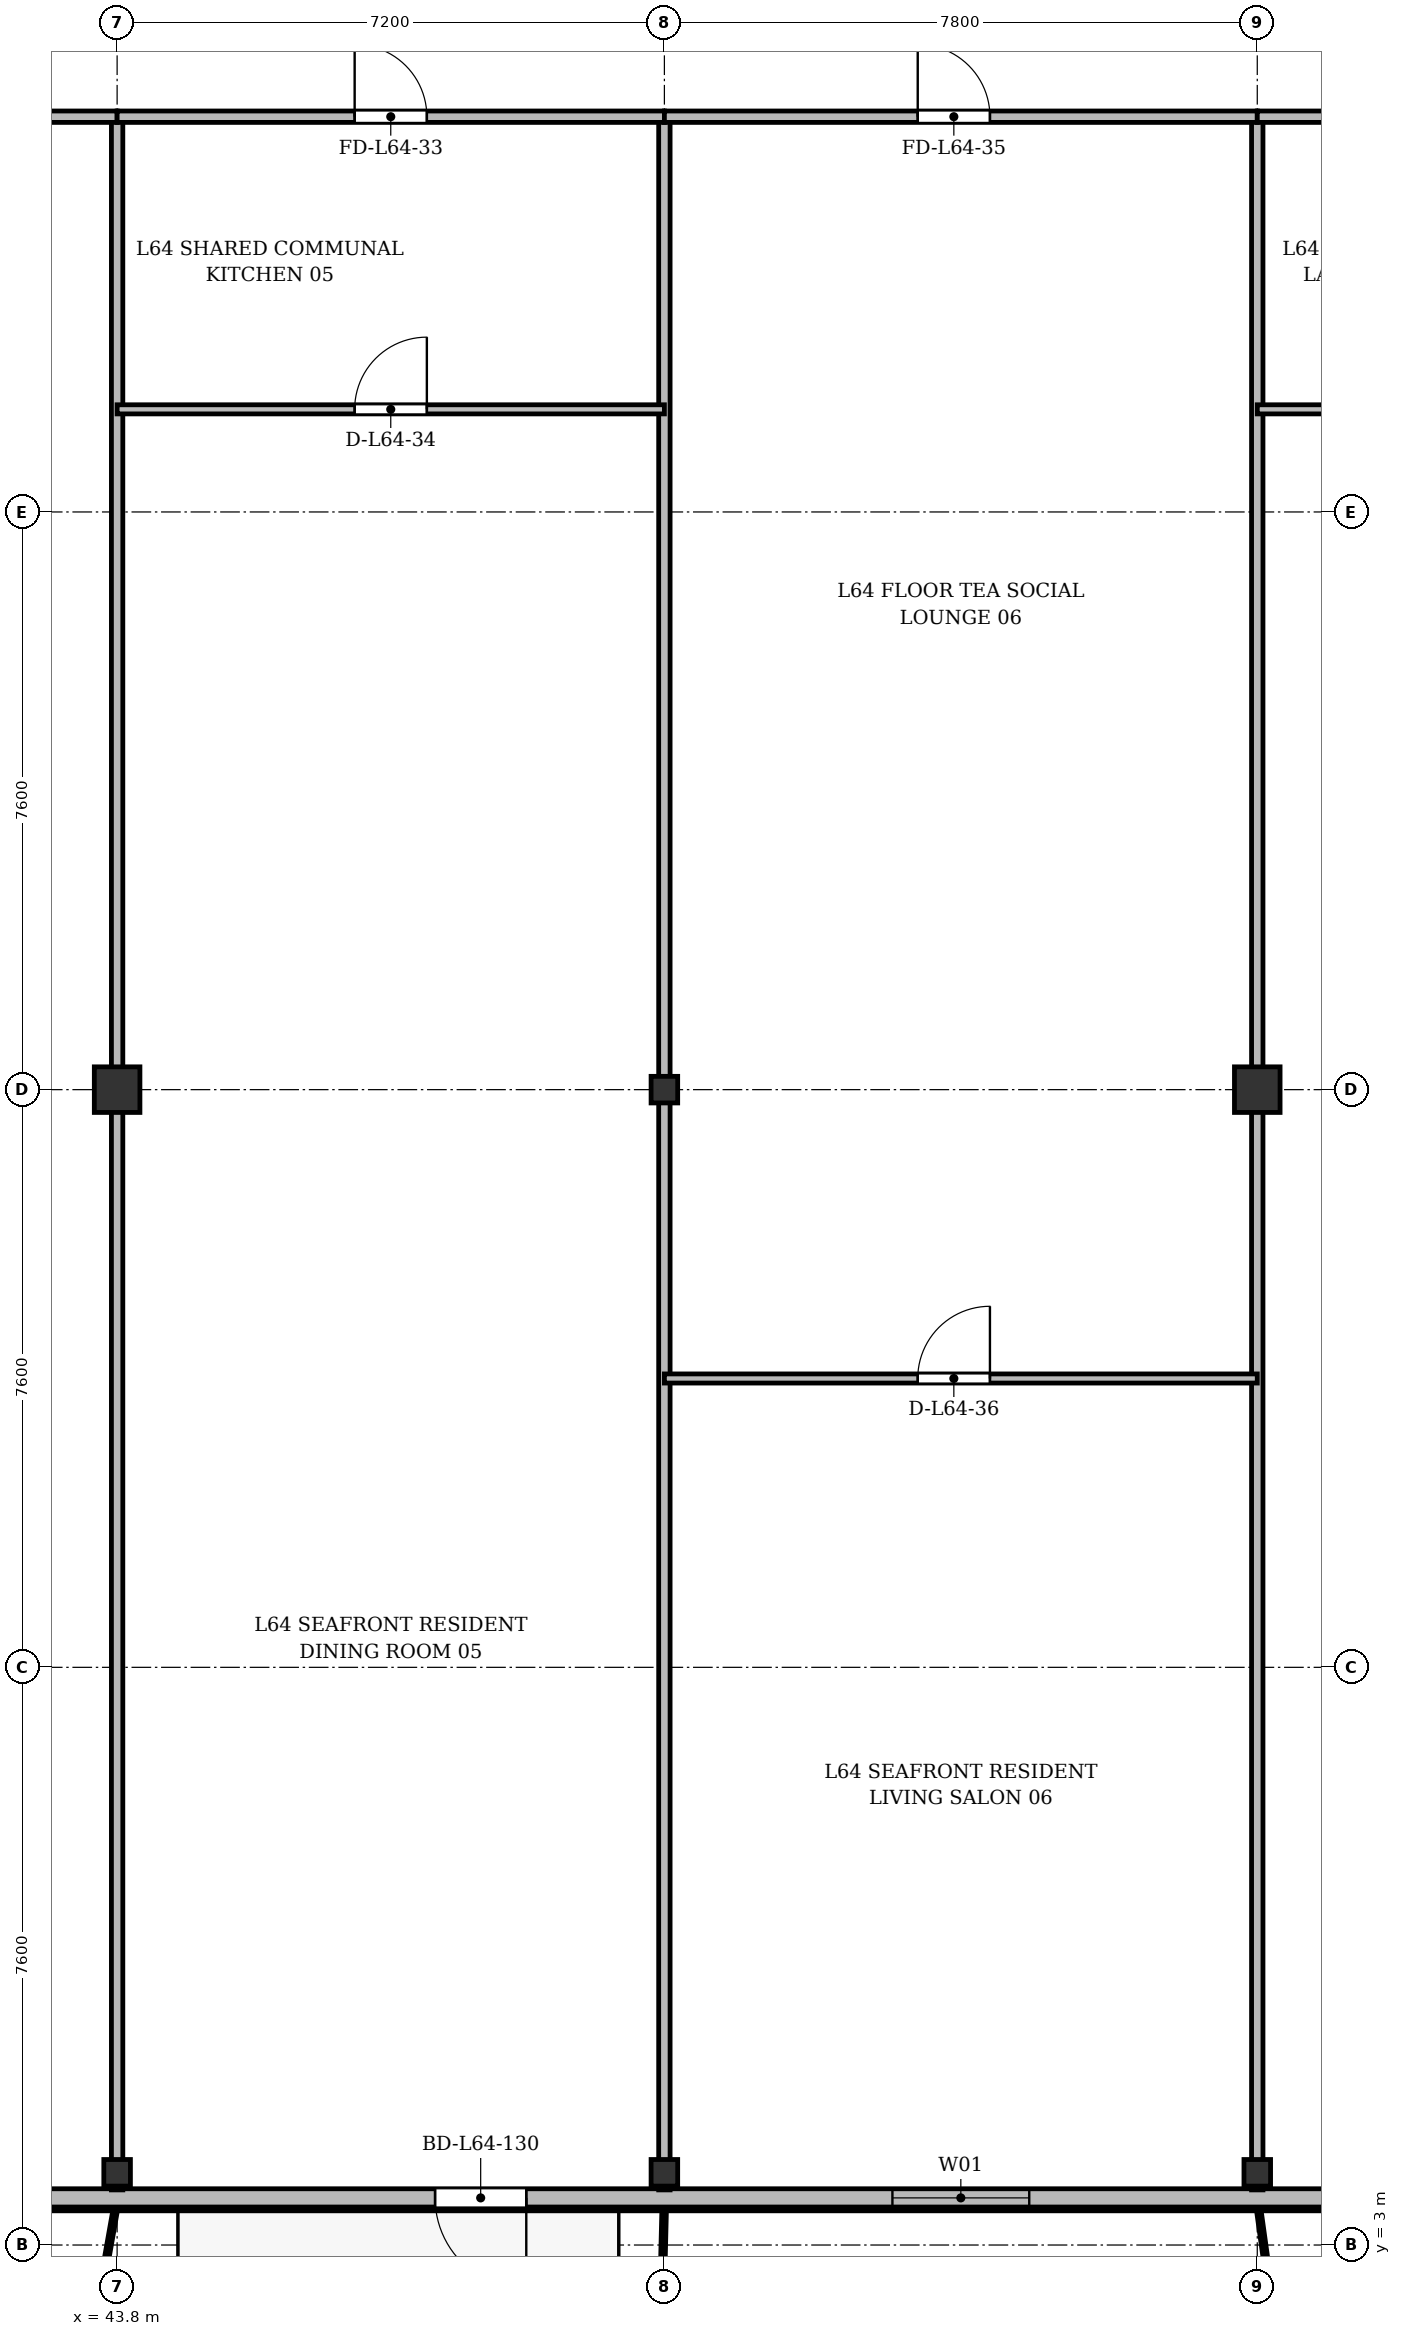
"""IFC4 building model, lengths in metres.
Left out: names, types, materials, properties, quantities, classifications, styles, units other than length and angle.
Written with IfcOpenShell. Run it as: python <this file> out.ifc"""

import sys

from ifc_helpers import new_model, si_unit, direction, frame, frame_2d, origin, origin_2d, place, context, subcontext, project, spatial, rectangle, i_section, extrude, source, transform, mapped, element, fill, save


model = new_model("IFC4")
c1 = context("Model", 3, precision=1e-05, world=origin(), true_north=direction((0.0, 1.0)))
c2 = subcontext(c1, "Body", "Model", "MODEL_VIEW")
j1 = project(units=[si_unit("LENGTHUNIT", "METRE"), si_unit("PLANEANGLEUNIT", "RADIAN")], contexts=[c1])
p1 = place(None, origin())
s1 = spatial("IfcSite", under=j1, at=p1, CompositionType="ELEMENT")
p2 = place(p1, origin())
s2 = spatial("IfcBuilding", under=s1, at=p2, CompositionType="ELEMENT")
p3 = place(p2, frame((0.0, 0.0, 248.7)))
s3 = spatial("IfcBuildingStorey", under=s2, at=p3, CompositionType="ELEMENT", Elevation=248.7)
m1 = source(origin(), c2, "Body", "SweptSolid", [
    extrude(i_section(OverallWidth=0.35, OverallDepth=0.35, WebThickness=0.018, FlangeThickness=0.028, at=origin_2d()), origin(), (0.0, 0.0, 1.0), 3.6),
])
p4 = place(p3, frame((43.8, 3.95, 0.0), z_axis=(0.0, 0.0, 1.0), x_axis=(1.0, 0.0, 0.0)))
e1 = element("IfcColumn", 1, at=p4, inside=s3, PredefinedType="COLUMN", context=c2, shape_type="MappedRepresentation", body=[
    mapped(m1, transform((0.0, 0.0, 0.0), x_axis=(1.0, 0.0, 0.0), y_axis=(0.0, 1.0, 0.0), z_axis=(0.0, 0.0, 1.0), scale=1.0)),
])
m2 = source(origin(), c2, "Body", "SweptSolid", [
    extrude(rectangle(XDim=0.6, YDim=0.6, at=origin_2d()), origin(), (0.0, 0.0, 1.0), 3.6),
])
p5 = place(p3, frame((43.8, 18.2, 0.0), z_axis=(0.0, 0.0, 1.0), x_axis=(1.0, 0.0, 0.0)))
e2 = element("IfcColumn", 2, at=p5, inside=s3, PredefinedType="COLUMN", context=c2, shape_type="MappedRepresentation", body=[
    mapped(m2, transform((0.0, 0.0, 0.0), x_axis=(1.0, 0.0, 0.0), y_axis=(0.0, 1.0, 0.0), z_axis=(0.0, 0.0, 1.0), scale=1.0)),
])
for number, where, z_axis, x_axis in (
    (3, (51.0, 3.95, 0.0), (0.0, 0.0, 1.0), (1.0, 0.0, 0.0)),
    (4, (51.0, 18.2, 0.0), (0.0, 0.0, 1.0), (1.0, 0.0, 0.0)),
    (5, (58.8, 3.95, 0.0), (0.0, 0.0, 1.0), (1.0, 0.0, 0.0)),
):
    element("IfcColumn", number, at=place(p3, frame(where, z_axis=z_axis, x_axis=x_axis)), inside=s3, PredefinedType="COLUMN", context=c2, shape_type="MappedRepresentation", body=[
        mapped(m1, transform((0.0, 0.0, 0.0), x_axis=(1.0, 0.0, 0.0), y_axis=(0.0, 1.0, 0.0), z_axis=(0.0, 0.0, 1.0), scale=1.0)),
    ])
p6 = place(p3, frame((58.8, 18.2, 0.0), z_axis=(0.0, 0.0, 1.0), x_axis=(1.0, 0.0, 0.0)))
e6 = element("IfcColumn", 6, at=p6, inside=s3, PredefinedType="COLUMN", context=c2, shape_type="MappedRepresentation", body=[
    mapped(m2, transform((0.0, 0.0, 0.0), x_axis=(1.0, 0.0, 0.0), y_axis=(0.0, 1.0, 0.0), z_axis=(0.0, 0.0, 1.0), scale=1.0)),
])
p7 = place(p3, frame((63.2, 3.62, 0.0), z_axis=(0.0, 0.0, 1.0), x_axis=(-1.0, 0.0, 0.0)))
e7 = element("IfcWall", 7, at=p7, inside=s3, PredefinedType="SOLIDWALL", context=c2, shape_type="SweptSolid", body=[
    extrude(rectangle(XDim=52.0, YDim=0.24, at=frame_2d((26.0, 0.0))), origin(), (0.0, 0.0, 1.0), 3.37),
])
p8 = place(p7, frame((1.42, 0.0, 0.9)))
e8 = element("IfcOpeningElement", 8, at=p8, cuts=e7, PredefinedType="OPENING", context=c2, shape_type="SweptSolid", body=[
    extrude(rectangle(XDim=1.65, YDim=1.85, at=frame_2d((0.825, 0.925))), frame((0.0, 0.13, 0.0), z_axis=(0.0, -1.0, 0.0), x_axis=(1.0, 0.0, 0.0)), (0.0, 0.0, 1.0), 0.26),
])
p9 = place(p7, frame((7.4, 0.0, 0.9)))
e9 = element("IfcOpeningElement", 9, at=p9, cuts=e7, PredefinedType="OPENING", context=c2, shape_type="SweptSolid", body=[
    extrude(rectangle(XDim=1.8, YDim=1.8, at=frame_2d((0.9, 0.9))), frame((0.0, 0.13, 0.0), z_axis=(0.0, -1.0, 0.0), x_axis=(1.0, 0.0, 0.0)), (0.0, 0.0, 1.0), 0.26),
])
p10 = place(p7, frame((14.017, 0.0, 0.0)))
e10 = element("IfcOpeningElement", 10, at=p10, cuts=e7, PredefinedType="OPENING", context=c2, shape_type="SweptSolid", body=[
    extrude(rectangle(XDim=1.2, YDim=2.2, at=frame_2d((0.6, 1.1))), frame((0.0, 0.13, 0.0), z_axis=(0.0, -1.0, 0.0), x_axis=(1.0, 0.0, 0.0)), (0.0, 0.0, 1.0), 0.26),
])
p11 = place(p7, frame((25.25, 0.0, 0.9)))
e11 = element("IfcOpeningElement", 11, at=p11, cuts=e7, PredefinedType="OPENING", context=c2, shape_type="SweptSolid", body=[
    extrude(rectangle(XDim=1.5, YDim=1.75, at=frame_2d((0.75, 0.875))), frame((0.0, 0.13, 0.0), z_axis=(0.0, -1.0, 0.0), x_axis=(1.0, 0.0, 0.0)), (0.0, 0.0, 1.0), 0.26),
])
p12 = place(p7, frame((35.2, 0.0, 0.9)))
e12 = element("IfcOpeningElement", 12, at=p12, cuts=e7, PredefinedType="OPENING", context=c2, shape_type="SweptSolid", body=[
    extrude(rectangle(XDim=2.0, YDim=1.95, at=frame_2d((1.0, 0.975))), frame((0.0, 0.13, 0.0), z_axis=(0.0, -1.0, 0.0), x_axis=(1.0, 0.0, 0.0)), (0.0, 0.0, 1.0), 0.26),
])
p13 = place(p7, frame((45.302, 0.0, 0.0)))
e13 = element("IfcOpeningElement", 13, at=p13, cuts=e7, PredefinedType="OPENING", context=c2, shape_type="SweptSolid", body=[
    extrude(rectangle(XDim=1.2, YDim=2.2, at=frame_2d((0.6, 1.1))), frame((0.0, 0.13, 0.0), z_axis=(0.0, -1.0, 0.0), x_axis=(1.0, 0.0, 0.0)), (0.0, 0.0, 1.0), 0.26),
])
p14 = place(p7, frame((48.855, 0.0, 0.9)))
e14 = element("IfcOpeningElement", 14, at=p14, cuts=e7, PredefinedType="OPENING", context=c2, shape_type="SweptSolid", body=[
    extrude(rectangle(XDim=1.8, YDim=1.8, at=frame_2d((0.9, 0.9))), frame((0.0, 0.13, 0.0), z_axis=(0.0, -1.0, 0.0), x_axis=(1.0, 0.0, 0.0)), (0.0, 0.0, 1.0), 0.26),
])
for number, where, z_axis, x_axis in (
    (15, (43.8, 3.725, 0.0), (0.0, 0.0, 1.0), (0.0, 1.0, 0.0)),
    (16, (51.0, 3.725, 0.0), (0.0, 0.0, 1.0), (0.0, 1.0, 0.0)),
    (17, (58.8, 3.725, 0.0), (0.0, 0.0, 1.0), (0.0, 1.0, 0.0)),
):
    element("IfcWall", number, at=place(p3, frame(where, z_axis=z_axis, x_axis=x_axis)), inside=s3, PredefinedType="PARTITIONING", context=c2, shape_type="SweptSolid", body=[
        extrude(rectangle(XDim=27.275, YDim=0.15, at=frame_2d((13.637, 0.0))), origin(), (0.0, 0.0, 1.0), 2.87),
    ])
p15 = place(p3, frame((30.6, 31.0, 0.0), z_axis=(0.0, 0.0, 1.0), x_axis=(1.0, 0.0, 0.0)))
e18 = element("IfcWall", 18, at=p15, inside=s3, PredefinedType="PARTITIONING", context=c2, shape_type="SweptSolid", body=[
    extrude(rectangle(XDim=13.2, YDim=0.15, at=frame_2d((6.6, 0.0))), origin(), (0.0, 0.0, 1.0), 2.87),
])
p16 = place(p15, frame((5.8, 0.0, 0.0)))
e19 = element("IfcOpeningElement", 19, at=p16, cuts=e18, PredefinedType="OPENING", context=c2, shape_type="SweptSolid", body=[
    extrude(rectangle(XDim=1.6, YDim=2.2, at=frame_2d((0.8, 1.1))), frame((0.0, 0.085, 0.0), z_axis=(0.0, -1.0, 0.0), x_axis=(1.0, 0.0, 0.0)), (0.0, 0.0, 1.0), 0.17),
])
p17 = place(p3, frame((43.8, 31.0, 0.0), z_axis=(0.0, 0.0, 1.0), x_axis=(1.0, 0.0, 0.0)))
e20 = element("IfcWall", 20, at=p17, inside=s3, PredefinedType="PARTITIONING", context=c2, shape_type="SweptSolid", body=[
    extrude(rectangle(XDim=7.2, YDim=0.15, at=frame_2d((3.6, 0.0))), origin(), (0.0, 0.0, 1.0), 2.87),
])
p18 = place(p17, frame((3.125, 0.0, 0.0)))
e21 = element("IfcOpeningElement", 21, at=p18, cuts=e20, PredefinedType="OPENING", context=c2, shape_type="SweptSolid", body=[
    extrude(rectangle(XDim=0.95, YDim=2.15, at=frame_2d((0.475, 1.075))), frame((0.0, 0.085, 0.0), z_axis=(0.0, -1.0, 0.0), x_axis=(1.0, 0.0, 0.0)), (0.0, 0.0, 1.0), 0.17),
])
p19 = place(p3, frame((43.8, 27.15, 0.0), z_axis=(0.0, 0.0, 1.0), x_axis=(1.0, 0.0, 0.0)))
e22 = element("IfcWall", 22, at=p19, inside=s3, PredefinedType="PARTITIONING", context=c2, shape_type="SweptSolid", body=[
    extrude(rectangle(XDim=7.2, YDim=0.12, at=frame_2d((3.6, 0.0))), origin(), (0.0, 0.0, 1.0), 2.87),
])
p20 = place(p19, frame((3.125, 0.0, 0.0)))
e23 = element("IfcOpeningElement", 23, at=p20, cuts=e22, PredefinedType="OPENING", context=c2, shape_type="SweptSolid", body=[
    extrude(rectangle(XDim=0.95, YDim=2.15, at=frame_2d((0.475, 1.075))), frame((0.0, 0.07, 0.0), z_axis=(0.0, -1.0, 0.0), x_axis=(1.0, 0.0, 0.0)), (0.0, 0.0, 1.0), 0.14),
])
p21 = place(p3, frame((51.0, 31.0, 0.0), z_axis=(0.0, 0.0, 1.0), x_axis=(1.0, 0.0, 0.0)))
e24 = element("IfcWall", 24, at=p21, inside=s3, PredefinedType="PARTITIONING", context=c2, shape_type="SweptSolid", body=[
    extrude(rectangle(XDim=7.8, YDim=0.15, at=frame_2d((3.9, 0.0))), origin(), (0.0, 0.0, 1.0), 2.87),
])
p22 = place(p21, frame((3.333, 0.0, 0.0)))
e25 = element("IfcOpeningElement", 25, at=p22, cuts=e24, PredefinedType="OPENING", context=c2, shape_type="SweptSolid", body=[
    extrude(rectangle(XDim=0.95, YDim=2.15, at=frame_2d((0.475, 1.075))), frame((0.0, 0.085, 0.0), z_axis=(0.0, -1.0, 0.0), x_axis=(1.0, 0.0, 0.0)), (0.0, 0.0, 1.0), 0.17),
])
p23 = place(p3, frame((51.0, 14.4, 0.0), z_axis=(0.0, 0.0, 1.0), x_axis=(1.0, 0.0, 0.0)))
e26 = element("IfcWall", 26, at=p23, inside=s3, PredefinedType="PARTITIONING", context=c2, shape_type="SweptSolid", body=[
    extrude(rectangle(XDim=7.8, YDim=0.12, at=frame_2d((3.9, 0.0))), origin(), (0.0, 0.0, 1.0), 2.87),
])
p24 = place(p23, frame((3.333, 0.0, 0.0)))
e27 = element("IfcOpeningElement", 27, at=p24, cuts=e26, PredefinedType="OPENING", context=c2, shape_type="SweptSolid", body=[
    extrude(rectangle(XDim=0.95, YDim=2.15, at=frame_2d((0.475, 1.075))), frame((0.0, 0.07, 0.0), z_axis=(0.0, -1.0, 0.0), x_axis=(1.0, 0.0, 0.0)), (0.0, 0.0, 1.0), 0.14),
])
p25 = place(p3, frame((58.8, 31.0, 0.0), z_axis=(0.0, 0.0, 1.0), x_axis=(1.0, 0.0, 0.0)))
e28 = element("IfcWall", 28, at=p25, inside=s3, PredefinedType="PARTITIONING", context=c2, shape_type="SweptSolid", body=[
    extrude(rectangle(XDim=7.175, YDim=0.15, at=frame_2d((3.587, 0.0))), origin(), (0.0, 0.0, 1.0), 2.87),
])
p26 = place(p25, frame((3.112, 0.0, 0.0)))
e29 = element("IfcOpeningElement", 29, at=p26, cuts=e28, PredefinedType="OPENING", context=c2, shape_type="SweptSolid", body=[
    extrude(rectangle(XDim=0.95, YDim=2.15, at=frame_2d((0.475, 1.075))), frame((0.0, 0.085, 0.0), z_axis=(0.0, -1.0, 0.0), x_axis=(1.0, 0.0, 0.0)), (0.0, 0.0, 1.0), 0.17),
])
p27 = place(p3, frame((58.8, 27.15, 0.0), z_axis=(0.0, 0.0, 1.0), x_axis=(1.0, 0.0, 0.0)))
e30 = element("IfcWall", 30, at=p27, inside=s3, PredefinedType="PARTITIONING", context=c2, shape_type="SweptSolid", body=[
    extrude(rectangle(XDim=7.175, YDim=0.12, at=frame_2d((3.587, 0.0))), origin(), (0.0, 0.0, 1.0), 2.87),
])
p28 = place(p27, frame((3.112, 0.0, 0.0)))
e31 = element("IfcOpeningElement", 31, at=p28, cuts=e30, PredefinedType="OPENING", context=c2, shape_type="SweptSolid", body=[
    extrude(rectangle(XDim=0.95, YDim=2.15, at=frame_2d((0.475, 1.075))), frame((0.0, 0.07, 0.0), z_axis=(0.0, -1.0, 0.0), x_axis=(1.0, 0.0, 0.0)), (0.0, 0.0, 1.0), 0.14),
])
m3 = source(origin(), c2, "Body", "SweptSolid", [
    extrude(rectangle(XDim=1.8, YDim=1.8, at=frame_2d((0.9, 0.9))), frame((0.0, 0.03, 0.0), z_axis=(0.0, -1.0, 0.0), x_axis=(1.0, 0.0, 0.0)), (0.0, 0.0, 1.0), 0.06),
])
p29 = place(p9, origin())
e32 = element("IfcWindow", 32, at=p29, inside=s3, PartitioningType="SINGLE_PANEL", PredefinedType="WINDOW", context=c2, shape_type="MappedRepresentation", body=[
    mapped(m3, transform((0.0, 0.0, 0.0), x_axis=(1.0, 0.0, 0.0), y_axis=(0.0, 1.0, 0.0), z_axis=(0.0, 0.0, 1.0), scale=1.0)),
])
fill(e9, e32)
m4 = source(origin(), c2, "Body", "SweptSolid", [
    extrude(rectangle(XDim=1.2, YDim=2.2, at=frame_2d((0.6, 1.1))), frame((0.0, 0.025, 0.0), z_axis=(0.0, -1.0, 0.0), x_axis=(1.0, 0.0, 0.0)), (0.0, 0.0, 1.0), 0.05),
])
p30 = place(p10, origin())
e33 = element("IfcDoor", 33, at=p30, inside=s3, OperationType="SINGLE_SWING_LEFT", PredefinedType="DOOR", context=c2, shape_type="MappedRepresentation", body=[
    mapped(m4, transform((0.0, 0.0, 0.0), x_axis=(1.0, 0.0, 0.0), y_axis=(0.0, 1.0, 0.0), z_axis=(0.0, 0.0, 1.0), scale=1.0)),
])
fill(e10, e33)
m5 = source(origin(), c2, "Body", "SweptSolid", [
    extrude(rectangle(XDim=0.95, YDim=2.15, at=frame_2d((0.475, 1.075))), frame((0.0, 0.025, 0.0), z_axis=(0.0, -1.0, 0.0), x_axis=(1.0, 0.0, 0.0)), (0.0, 0.0, 1.0), 0.05),
])
p31 = place(p18, origin())
e34 = element("IfcDoor", 34, at=p31, inside=s3, OperationType="SINGLE_SWING_LEFT", PredefinedType="DOOR", context=c2, shape_type="MappedRepresentation", body=[
    mapped(m5, transform((0.0, 0.0, 0.0), x_axis=(1.0, 0.0, 0.0), y_axis=(0.0, 1.0, 0.0), z_axis=(0.0, 0.0, 1.0), scale=1.0)),
])
fill(e21, e34)
p32 = place(p20, origin())
e35 = element("IfcDoor", 35, at=p32, inside=s3, OperationType="SINGLE_SWING_RIGHT", PredefinedType="DOOR", context=c2, shape_type="MappedRepresentation", body=[
    mapped(m5, transform((0.0, 0.0, 0.0), x_axis=(1.0, 0.0, 0.0), y_axis=(0.0, 1.0, 0.0), z_axis=(0.0, 0.0, 1.0), scale=1.0)),
])
fill(e23, e35)
p33 = place(p22, origin())
e36 = element("IfcDoor", 36, at=p33, inside=s3, OperationType="SINGLE_SWING_LEFT", PredefinedType="DOOR", context=c2, shape_type="MappedRepresentation", body=[
    mapped(m5, transform((0.0, 0.0, 0.0), x_axis=(1.0, 0.0, 0.0), y_axis=(0.0, 1.0, 0.0), z_axis=(0.0, 0.0, 1.0), scale=1.0)),
])
fill(e25, e36)
p34 = place(p24, origin())
e37 = element("IfcDoor", 37, at=p34, inside=s3, OperationType="SINGLE_SWING_RIGHT", PredefinedType="DOOR", context=c2, shape_type="MappedRepresentation", body=[
    mapped(m5, transform((0.0, 0.0, 0.0), x_axis=(1.0, 0.0, 0.0), y_axis=(0.0, 1.0, 0.0), z_axis=(0.0, 0.0, 1.0), scale=1.0)),
])
fill(e27, e37)
save(model, sys.argv[1])
